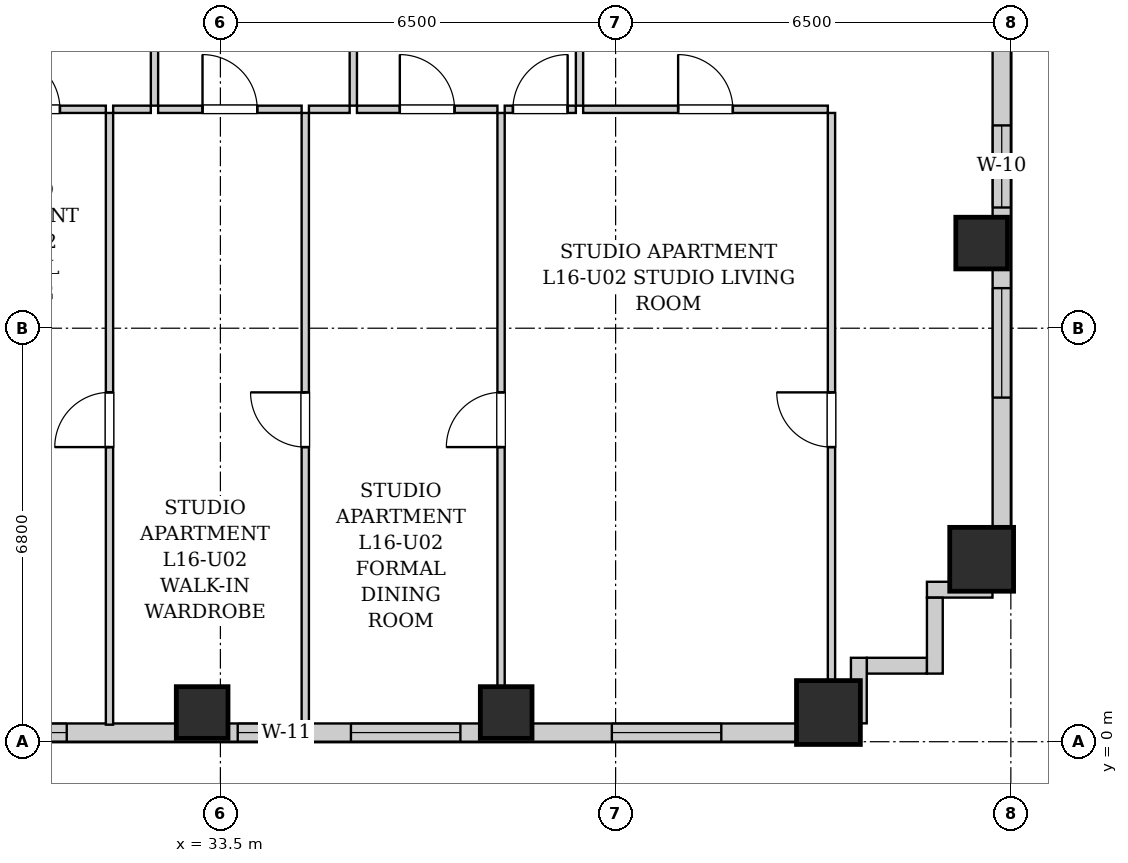
"""IFC4 building model, lengths in metres.
Left out: names, types, materials, properties, quantities, classifications, styles, units other than length and angle.
Written with IfcOpenShell. Run it as: python <this file> out.ifc"""

import sys

from ifc_helpers import new_model, si_unit, direction, frame, frame_2d, origin, origin_2d, place, context, subcontext, project, spatial, rectangle, extrude, element, fill, save


model = new_model("IFC4")
c1 = context("Model", 3, precision=1e-05, world=origin(), true_north=direction((0.0, 1.0)))
c2 = subcontext(c1, "Body", "Model", "MODEL_VIEW")
j1 = project(units=[si_unit("LENGTHUNIT", "METRE"), si_unit("PLANEANGLEUNIT", "RADIAN")], contexts=[c1])
p1 = place(None, origin())
s1 = spatial("IfcSite", under=j1, at=p1, CompositionType="ELEMENT")
p2 = place(p1, origin())
s2 = spatial("IfcBuilding", under=s1, at=p2, CompositionType="ELEMENT")
p3 = place(p2, frame((0.0, 0.0, 61.0)))
s3 = spatial("IfcBuildingStorey", under=s2, at=p3, CompositionType="ELEMENT", Elevation=61.0)
for number, where, z_axis, x_axis in (
    (1, (33.2, 0.48, 0.0), (0.0, 0.0, 1.0), (1.0, 0.0, 0.0)),
    (2, (38.2, 0.48, 0.0), (0.0, 0.0, 1.0), (1.0, 0.0, 0.0)),
):
    element("IfcColumn", number, at=place(p3, frame(where, z_axis=z_axis, x_axis=x_axis)), inside=s3, PredefinedType="COLUMN", context=c2, shape_type="SweptSolid", body=[
        extrude(rectangle(XDim=0.85, YDim=0.85, at=origin_2d()), origin(), (0.0, 0.0, 1.0), 3.2),
    ])
for number, where, z_axis, x_axis in (
    (3, (43.5, 0.48, 0.0), (0.0, 0.0, 1.0), (1.0, 0.0, 0.0)),
    (4, (46.02, 3.0, 0.0), (0.0, 0.0, 1.0), (1.0, 0.0, 0.0)),
):
    element("IfcColumn", number, at=place(p3, frame(where, z_axis=z_axis, x_axis=x_axis)), inside=s3, PredefinedType="COLUMN", context=c2, shape_type="SweptSolid", body=[
        extrude(rectangle(XDim=1.05, YDim=1.05, at=origin_2d()), origin(), (0.0, 0.0, 1.0), 3.2),
    ])
p4 = place(p3, frame((46.02, 8.2, 0.0), z_axis=(0.0, 0.0, 1.0), x_axis=(1.0, 0.0, 0.0)))
e5 = element("IfcColumn", 5, at=p4, inside=s3, PredefinedType="COLUMN", context=c2, shape_type="SweptSolid", body=[
    extrude(rectangle(XDim=0.85, YDim=0.85, at=origin_2d()), origin(), (0.0, 0.0, 1.0), 3.2),
])
p5 = place(p3, frame((46.35, 24.6, 0.0), z_axis=(0.0, 0.0, 1.0), x_axis=(0.0, -1.0, 0.0)))
e6 = element("IfcWall", 6, at=p5, inside=s3, PredefinedType="SOLIDWALL", context=c2, shape_type="SweptSolid", body=[
    extrude(rectangle(XDim=22.1, YDim=0.3, at=frame_2d((11.05, 0.0))), origin(), (0.0, 0.0, 1.0), 1.975),
])
p6 = place(p5, frame((17.141, 0.0, 0.55)))
e7 = element("IfcOpeningElement", 7, at=p6, cuts=e6, PredefinedType="OPENING", context=c2, shape_type="SweptSolid", body=[
    extrude(rectangle(XDim=1.8, YDim=1.2, at=frame_2d((0.9, 0.6))), frame((0.0, 0.16, 0.0), z_axis=(0.0, -1.0, 0.0), x_axis=(1.0, 0.0, 0.0)), (0.0, 0.0, 1.0), 0.32),
])
p7 = place(p5, frame((14.465, 0.0, 0.55)))
e8 = element("IfcOpeningElement", 8, at=p7, cuts=e6, PredefinedType="OPENING", context=c2, shape_type="SweptSolid", body=[
    extrude(rectangle(XDim=1.35, YDim=1.2, at=frame_2d((0.675, 0.6))), frame((0.0, 0.16, 0.0), z_axis=(0.0, -1.0, 0.0), x_axis=(1.0, 0.0, 0.0)), (0.0, 0.0, 1.0), 0.32),
])
p8 = place(p3, frame((44.0, 0.15, 0.0), z_axis=(0.0, 0.0, 1.0), x_axis=(-1.0, 0.0, 0.0)))
e9 = element("IfcWall", 9, at=p8, inside=s3, PredefinedType="SOLIDWALL", context=c2, shape_type="SweptSolid", body=[
    extrude(rectangle(XDim=26.35, YDim=0.3, at=frame_2d((13.175, 0.0))), origin(), (0.0, 0.0, 1.0), 1.975),
])
p9 = place(p8, frame((22.665, 0.0, 0.55)))
e10 = element("IfcOpeningElement", 10, at=p9, cuts=e9, PredefinedType="OPENING", context=c2, shape_type="SweptSolid", body=[
    extrude(rectangle(XDim=1.8, YDim=1.2, at=frame_2d((0.9, 0.6))), frame((0.0, 0.16, 0.0), z_axis=(0.0, -1.0, 0.0), x_axis=(1.0, 0.0, 0.0)), (0.0, 0.0, 1.0), 0.32),
])
p10 = place(p8, frame((15.82, 0.0, 0.55)))
e11 = element("IfcOpeningElement", 11, at=p10, cuts=e9, PredefinedType="OPENING", context=c2, shape_type="SweptSolid", body=[
    extrude(rectangle(XDim=0.68, YDim=1.2, at=frame_2d((0.34, 0.6))), frame((0.0, 0.16, 0.0), z_axis=(0.0, -1.0, 0.0), x_axis=(1.0, 0.0, 0.0)), (0.0, 0.0, 1.0), 0.32),
])
p11 = place(p8, frame((13.027, 0.0, 0.55)))
e12 = element("IfcOpeningElement", 12, at=p11, cuts=e9, PredefinedType="OPENING", context=c2, shape_type="SweptSolid", body=[
    extrude(rectangle(XDim=1.8, YDim=1.2, at=frame_2d((0.9, 0.6))), frame((0.0, 0.16, 0.0), z_axis=(0.0, -1.0, 0.0), x_axis=(1.0, 0.0, 0.0)), (0.0, 0.0, 1.0), 0.32),
])
p12 = place(p8, frame((9.365, 0.0, 0.55)))
e13 = element("IfcOpeningElement", 13, at=p12, cuts=e9, PredefinedType="OPENING", context=c2, shape_type="SweptSolid", body=[
    extrude(rectangle(XDim=0.85, YDim=1.2, at=frame_2d((0.425, 0.6))), frame((0.0, 0.16, 0.0), z_axis=(0.0, -1.0, 0.0), x_axis=(1.0, 0.0, 0.0)), (0.0, 0.0, 1.0), 0.32),
])
p13 = place(p8, frame((6.553, 0.0, 0.55)))
e14 = element("IfcOpeningElement", 14, at=p13, cuts=e9, PredefinedType="OPENING", context=c2, shape_type="SweptSolid", body=[
    extrude(rectangle(XDim=1.8, YDim=1.2, at=frame_2d((0.9, 0.6))), frame((0.0, 0.16, 0.0), z_axis=(0.0, -1.0, 0.0), x_axis=(1.0, 0.0, 0.0)), (0.0, 0.0, 1.0), 0.32),
])
p14 = place(p8, frame((2.262, 0.0, 0.55)))
e15 = element("IfcOpeningElement", 15, at=p14, cuts=e9, PredefinedType="OPENING", context=c2, shape_type="SweptSolid", body=[
    extrude(rectangle(XDim=1.8, YDim=1.2, at=frame_2d((0.9, 0.6))), frame((0.0, 0.16, 0.0), z_axis=(0.0, -1.0, 0.0), x_axis=(1.0, 0.0, 0.0)), (0.0, 0.0, 1.0), 0.32),
])
p15 = place(p3, frame((46.198, 2.5, 0.0), z_axis=(0.0, 0.0, 1.0), x_axis=(-1.0, 0.0, 0.0)))
e16 = element("IfcWall", 16, at=p15, inside=s3, PredefinedType="SOLIDWALL", context=c2, shape_type="SweptSolid", body=[
    extrude(rectangle(XDim=1.078, YDim=0.26, at=frame_2d((0.539, 0.0))), origin(), (0.0, 0.0, 1.0), 2.94),
])
p16 = place(p3, frame((45.25, 2.368, 0.0), z_axis=(0.0, 0.0, 1.0), x_axis=(0.0, -1.0, 0.0)))
e17 = element("IfcWall", 17, at=p16, inside=s3, PredefinedType="SOLIDWALL", context=c2, shape_type="SweptSolid", body=[
    extrude(rectangle(XDim=1.248, YDim=0.26, at=frame_2d((0.624, 0.0))), origin(), (0.0, 0.0, 1.0), 2.94),
])
p17 = place(p3, frame((45.118, 1.25, 0.0), z_axis=(0.0, 0.0, 1.0), x_axis=(-1.0, 0.0, 0.0)))
e18 = element("IfcWall", 18, at=p17, inside=s3, PredefinedType="SOLIDWALL", context=c2, shape_type="SweptSolid", body=[
    extrude(rectangle(XDim=0.986, YDim=0.26, at=frame_2d((0.493, 0.0))), origin(), (0.0, 0.0, 1.0), 2.94),
])
p18 = place(p3, frame((44.0, 1.38, 0.0), z_axis=(0.0, 0.0, 1.0), x_axis=(0.0, -1.0, 0.0)))
e19 = element("IfcWall", 19, at=p18, inside=s3, PredefinedType="SOLIDWALL", context=c2, shape_type="SweptSolid", body=[
    extrude(rectangle(XDim=1.078, YDim=0.26, at=frame_2d((0.539, 0.0))), origin(), (0.0, 0.0, 1.0), 2.94),
])
p19 = place(p3, frame((32.416, 10.46, 0.0), z_axis=(0.0, 0.0, 1.0), x_axis=(0.0, 1.0, 0.0)))
e20 = element("IfcWall", 20, at=p19, inside=s3, PredefinedType="PARTITIONING", context=c2, shape_type="SweptSolid", body=[
    extrude(rectangle(XDim=2.85, YDim=0.12, at=frame_2d((1.425, 0.0))), origin(), (0.0, 0.0, 1.0), 2.94),
])
p20 = place(p19, frame((0.975, 0.0, 0.0)))
e21 = element("IfcOpeningElement", 21, at=p20, cuts=e20, PredefinedType="OPENING", context=c2, shape_type="SweptSolid", body=[
    extrude(rectangle(XDim=0.9, YDim=2.05, at=frame_2d((0.45, 1.025))), frame((0.0, 0.07, 0.0), z_axis=(0.0, -1.0, 0.0), x_axis=(1.0, 0.0, 0.0)), (0.0, 0.0, 1.0), 0.14),
])
p21 = place(p3, frame((29.206, 10.4, 0.0), z_axis=(0.0, 0.0, 1.0), x_axis=(1.0, 0.0, 0.0)))
e22 = element("IfcWall", 22, at=p21, inside=s3, PredefinedType="PARTITIONING", context=c2, shape_type="SweptSolid", body=[
    extrude(rectangle(XDim=2.41, YDim=0.12, at=frame_2d((1.205, 0.0))), origin(), (0.0, 0.0, 1.0), 2.94),
])
p22 = place(p21, frame((0.755, 0.0, 0.0)))
e23 = element("IfcOpeningElement", 23, at=p22, cuts=e22, PredefinedType="OPENING", context=c2, shape_type="SweptSolid", body=[
    extrude(rectangle(XDim=0.9, YDim=2.05, at=frame_2d((0.45, 1.025))), frame((0.0, 0.07, 0.0), z_axis=(0.0, -1.0, 0.0), x_axis=(1.0, 0.0, 0.0)), (0.0, 0.0, 1.0), 0.14),
])
p23 = place(p3, frame((31.736, 10.4, 0.0), z_axis=(0.0, 0.0, 1.0), x_axis=(1.0, 0.0, 0.0)))
e24 = element("IfcWall", 24, at=p23, inside=s3, PredefinedType="PARTITIONING", context=c2, shape_type="SweptSolid", body=[
    extrude(rectangle(XDim=0.62, YDim=0.12, at=frame_2d((0.31, 0.0))), origin(), (0.0, 0.0, 1.0), 2.94),
])
p24 = place(p3, frame((35.686, 10.46, 0.0), z_axis=(0.0, 0.0, 1.0), x_axis=(0.0, 1.0, 0.0)))
e25 = element("IfcWall", 25, at=p24, inside=s3, PredefinedType="PARTITIONING", context=c2, shape_type="SweptSolid", body=[
    extrude(rectangle(XDim=2.85, YDim=0.12, at=frame_2d((1.425, 0.0))), origin(), (0.0, 0.0, 1.0), 2.94),
])
p25 = place(p24, frame((0.975, 0.0, 0.0)))
e26 = element("IfcOpeningElement", 26, at=p25, cuts=e25, PredefinedType="OPENING", context=c2, shape_type="SweptSolid", body=[
    extrude(rectangle(XDim=0.9, YDim=2.05, at=frame_2d((0.45, 1.025))), frame((0.0, 0.07, 0.0), z_axis=(0.0, -1.0, 0.0), x_axis=(1.0, 0.0, 0.0)), (0.0, 0.0, 1.0), 0.14),
])
p26 = place(p3, frame((32.476, 10.4, 0.0), z_axis=(0.0, 0.0, 1.0), x_axis=(1.0, 0.0, 0.0)))
e27 = element("IfcWall", 27, at=p26, inside=s3, PredefinedType="PARTITIONING", context=c2, shape_type="SweptSolid", body=[
    extrude(rectangle(XDim=2.36, YDim=0.12, at=frame_2d((1.18, 0.0))), origin(), (0.0, 0.0, 1.0), 2.94),
])
p27 = place(p26, frame((0.73, 0.0, 0.0)))
e28 = element("IfcOpeningElement", 28, at=p27, cuts=e27, PredefinedType="OPENING", context=c2, shape_type="SweptSolid", body=[
    extrude(rectangle(XDim=0.9, YDim=2.05, at=frame_2d((0.45, 1.025))), frame((0.0, 0.07, 0.0), z_axis=(0.0, -1.0, 0.0), x_axis=(1.0, 0.0, 0.0)), (0.0, 0.0, 1.0), 0.14),
])
p28 = place(p3, frame((34.956, 10.4, 0.0), z_axis=(0.0, 0.0, 1.0), x_axis=(1.0, 0.0, 0.0)))
e29 = element("IfcWall", 29, at=p28, inside=s3, PredefinedType="PARTITIONING", context=c2, shape_type="SweptSolid", body=[
    extrude(rectangle(XDim=0.67, YDim=0.12, at=frame_2d((0.335, 0.0))), origin(), (0.0, 0.0, 1.0), 2.94),
])
p29 = place(p3, frame((39.406, 10.46, 0.0), z_axis=(0.0, 0.0, 1.0), x_axis=(0.0, 1.0, 0.0)))
e30 = element("IfcWall", 30, at=p29, inside=s3, PredefinedType="PARTITIONING", context=c2, shape_type="SweptSolid", body=[
    extrude(rectangle(XDim=2.85, YDim=0.12, at=frame_2d((1.425, 0.0))), origin(), (0.0, 0.0, 1.0), 2.94),
])
p30 = place(p29, frame((0.975, 0.0, 0.0)))
e31 = element("IfcOpeningElement", 31, at=p30, cuts=e30, PredefinedType="OPENING", context=c2, shape_type="SweptSolid", body=[
    extrude(rectangle(XDim=0.9, YDim=2.05, at=frame_2d((0.45, 1.025))), frame((0.0, 0.07, 0.0), z_axis=(0.0, -1.0, 0.0), x_axis=(1.0, 0.0, 0.0)), (0.0, 0.0, 1.0), 0.14),
])
p31 = place(p3, frame((35.746, 10.4, 0.0), z_axis=(0.0, 0.0, 1.0), x_axis=(1.0, 0.0, 0.0)))
e32 = element("IfcWall", 32, at=p31, inside=s3, PredefinedType="PARTITIONING", context=c2, shape_type="SweptSolid", body=[
    extrude(rectangle(XDim=2.31, YDim=0.12, at=frame_2d((1.155, 0.0))), origin(), (0.0, 0.0, 1.0), 2.94),
])
p32 = place(p31, frame((0.705, 0.0, 0.0)))
e33 = element("IfcOpeningElement", 33, at=p32, cuts=e32, PredefinedType="OPENING", context=c2, shape_type="SweptSolid", body=[
    extrude(rectangle(XDim=0.9, YDim=2.05, at=frame_2d((0.45, 1.025))), frame((0.0, 0.07, 0.0), z_axis=(0.0, -1.0, 0.0), x_axis=(1.0, 0.0, 0.0)), (0.0, 0.0, 1.0), 0.14),
])
p33 = place(p3, frame((38.176, 10.4, 0.0), z_axis=(0.0, 0.0, 1.0), x_axis=(1.0, 0.0, 0.0)))
e34 = element("IfcWall", 34, at=p33, inside=s3, PredefinedType="PARTITIONING", context=c2, shape_type="SweptSolid", body=[
    extrude(rectangle(XDim=1.17, YDim=0.12, at=frame_2d((0.585, 0.0))), origin(), (0.0, 0.0, 1.0), 2.94),
])
p34 = place(p33, frame((0.135, 0.0, 0.0)))
e35 = element("IfcOpeningElement", 35, at=p34, cuts=e34, PredefinedType="OPENING", context=c2, shape_type="SweptSolid", body=[
    extrude(rectangle(XDim=0.9, YDim=2.05, at=frame_2d((0.45, 1.025))), frame((0.0, 0.07, 0.0), z_axis=(0.0, -1.0, 0.0), x_axis=(1.0, 0.0, 0.0)), (0.0, 0.0, 1.0), 0.14),
])
p35 = place(p3, frame((39.466, 10.4, 0.0), z_axis=(0.0, 0.0, 1.0), x_axis=(1.0, 0.0, 0.0)))
e36 = element("IfcWall", 36, at=p35, inside=s3, PredefinedType="PARTITIONING", context=c2, shape_type="SweptSolid", body=[
    extrude(rectangle(XDim=4.024, YDim=0.12, at=frame_2d((2.012, 0.0))), origin(), (0.0, 0.0, 1.0), 2.94),
])
p36 = place(p35, frame((1.562, 0.0, 0.0)))
e37 = element("IfcOpeningElement", 37, at=p36, cuts=e36, PredefinedType="OPENING", context=c2, shape_type="SweptSolid", body=[
    extrude(rectangle(XDim=0.9, YDim=2.05, at=frame_2d((0.45, 1.025))), frame((0.0, 0.07, 0.0), z_axis=(0.0, -1.0, 0.0), x_axis=(1.0, 0.0, 0.0)), (0.0, 0.0, 1.0), 0.14),
])
p37 = place(p3, frame((31.676, 0.28, 0.0), z_axis=(0.0, 0.0, 1.0), x_axis=(0.0, 1.0, 0.0)))
e38 = element("IfcWall", 38, at=p37, inside=s3, PredefinedType="PARTITIONING", context=c2, shape_type="SweptSolid", body=[
    extrude(rectangle(XDim=10.06, YDim=0.12, at=frame_2d((5.03, 0.0))), origin(), (0.0, 0.0, 1.0), 2.94),
])
p38 = place(p37, frame((4.565, 0.0, 0.0)))
e39 = element("IfcOpeningElement", 39, at=p38, cuts=e38, PredefinedType="OPENING", context=c2, shape_type="SweptSolid", body=[
    extrude(rectangle(XDim=0.9, YDim=2.05, at=frame_2d((0.45, 1.025))), frame((0.0, 0.07, 0.0), z_axis=(0.0, -1.0, 0.0), x_axis=(1.0, 0.0, 0.0)), (0.0, 0.0, 1.0), 0.14),
])
p39 = place(p3, frame((34.896, 0.28, 0.0), z_axis=(0.0, 0.0, 1.0), x_axis=(0.0, 1.0, 0.0)))
e40 = element("IfcWall", 40, at=p39, inside=s3, PredefinedType="PARTITIONING", context=c2, shape_type="SweptSolid", body=[
    extrude(rectangle(XDim=10.06, YDim=0.12, at=frame_2d((5.03, 0.0))), origin(), (0.0, 0.0, 1.0), 2.94),
])
p40 = place(p39, frame((4.565, 0.0, 0.0)))
e41 = element("IfcOpeningElement", 41, at=p40, cuts=e40, PredefinedType="OPENING", context=c2, shape_type="SweptSolid", body=[
    extrude(rectangle(XDim=0.9, YDim=2.05, at=frame_2d((0.45, 1.025))), frame((0.0, 0.07, 0.0), z_axis=(0.0, -1.0, 0.0), x_axis=(1.0, 0.0, 0.0)), (0.0, 0.0, 1.0), 0.14),
])
p41 = place(p3, frame((38.116, 0.28, 0.0), z_axis=(0.0, 0.0, 1.0), x_axis=(0.0, 1.0, 0.0)))
e42 = element("IfcWall", 42, at=p41, inside=s3, PredefinedType="PARTITIONING", context=c2, shape_type="SweptSolid", body=[
    extrude(rectangle(XDim=10.06, YDim=0.12, at=frame_2d((5.03, 0.0))), origin(), (0.0, 0.0, 1.0), 2.94),
])
p42 = place(p41, frame((4.565, 0.0, 0.0)))
e43 = element("IfcOpeningElement", 43, at=p42, cuts=e42, PredefinedType="OPENING", context=c2, shape_type="SweptSolid", body=[
    extrude(rectangle(XDim=0.9, YDim=2.05, at=frame_2d((0.45, 1.025))), frame((0.0, 0.07, 0.0), z_axis=(0.0, -1.0, 0.0), x_axis=(1.0, 0.0, 0.0)), (0.0, 0.0, 1.0), 0.14),
])
p43 = place(p3, frame((43.55, 0.28, 0.0), z_axis=(0.0, 0.0, 1.0), x_axis=(0.0, 1.0, 0.0)))
e44 = element("IfcWall", 44, at=p43, inside=s3, PredefinedType="PARTITIONING", context=c2, shape_type="SweptSolid", body=[
    extrude(rectangle(XDim=10.06, YDim=0.12, at=frame_2d((5.03, 0.0))), origin(), (0.0, 0.0, 1.0), 2.94),
])
p44 = place(p43, frame((4.565, 0.0, 0.0)))
e45 = element("IfcOpeningElement", 45, at=p44, cuts=e44, PredefinedType="OPENING", context=c2, shape_type="SweptSolid", body=[
    extrude(rectangle(XDim=0.9, YDim=2.05, at=frame_2d((0.45, 1.025))), frame((0.0, 0.07, 0.0), z_axis=(0.0, -1.0, 0.0), x_axis=(1.0, 0.0, 0.0)), (0.0, 0.0, 1.0), 0.14),
])
p45 = place(p22, origin())
e46 = element("IfcDoor", 46, at=p45, inside=s3, OperationType="SINGLE_SWING_LEFT", PredefinedType="DOOR", context=c2, shape_type="SweptSolid", body=[
    extrude(rectangle(XDim=0.9, YDim=2.05, at=frame_2d((0.45, 1.025))), frame((0.0, 0.025, 0.0), z_axis=(0.0, -1.0, 0.0), x_axis=(1.0, 0.0, 0.0)), (0.0, 0.0, 1.0), 0.05),
])
fill(e23, e46)
p46 = place(p27, origin())
e47 = element("IfcDoor", 47, at=p46, inside=s3, OperationType="SINGLE_SWING_LEFT", PredefinedType="DOOR", context=c2, shape_type="SweptSolid", body=[
    extrude(rectangle(XDim=0.9, YDim=2.05, at=frame_2d((0.45, 1.025))), frame((0.0, 0.025, 0.0), z_axis=(0.0, -1.0, 0.0), x_axis=(1.0, 0.0, 0.0)), (0.0, 0.0, 1.0), 0.05),
])
fill(e28, e47)
p47 = place(p32, origin())
e48 = element("IfcDoor", 48, at=p47, inside=s3, OperationType="SINGLE_SWING_LEFT", PredefinedType="DOOR", context=c2, shape_type="SweptSolid", body=[
    extrude(rectangle(XDim=0.9, YDim=2.05, at=frame_2d((0.45, 1.025))), frame((0.0, 0.025, 0.0), z_axis=(0.0, -1.0, 0.0), x_axis=(1.0, 0.0, 0.0)), (0.0, 0.0, 1.0), 0.05),
])
fill(e33, e48)
p48 = place(p34, origin())
e49 = element("IfcDoor", 49, at=p48, inside=s3, OperationType="SINGLE_SWING_RIGHT", PredefinedType="DOOR", context=c2, shape_type="SweptSolid", body=[
    extrude(rectangle(XDim=0.9, YDim=2.05, at=frame_2d((0.45, 1.025))), frame((0.0, 0.025, 0.0), z_axis=(0.0, -1.0, 0.0), x_axis=(1.0, 0.0, 0.0)), (0.0, 0.0, 1.0), 0.05),
])
fill(e35, e49)
p49 = place(p36, origin())
e50 = element("IfcDoor", 50, at=p49, inside=s3, OperationType="SINGLE_SWING_LEFT", PredefinedType="DOOR", context=c2, shape_type="SweptSolid", body=[
    extrude(rectangle(XDim=0.9, YDim=2.05, at=frame_2d((0.45, 1.025))), frame((0.0, 0.025, 0.0), z_axis=(0.0, -1.0, 0.0), x_axis=(1.0, 0.0, 0.0)), (0.0, 0.0, 1.0), 0.05),
])
fill(e37, e50)
p50 = place(p38, origin())
e51 = element("IfcDoor", 51, at=p50, inside=s3, OperationType="SINGLE_SWING_LEFT", PredefinedType="DOOR", context=c2, shape_type="SweptSolid", body=[
    extrude(rectangle(XDim=0.9, YDim=2.05, at=frame_2d((0.45, 1.025))), frame((0.0, 0.025, 0.0), z_axis=(0.0, -1.0, 0.0), x_axis=(1.0, 0.0, 0.0)), (0.0, 0.0, 1.0), 0.05),
])
fill(e39, e51)
p51 = place(p40, origin())
e52 = element("IfcDoor", 52, at=p51, inside=s3, OperationType="SINGLE_SWING_RIGHT", PredefinedType="DOOR", context=c2, shape_type="SweptSolid", body=[
    extrude(rectangle(XDim=0.9, YDim=2.05, at=frame_2d((0.45, 1.025))), frame((0.0, 0.025, 0.0), z_axis=(0.0, -1.0, 0.0), x_axis=(1.0, 0.0, 0.0)), (0.0, 0.0, 1.0), 0.05),
])
fill(e41, e52)
p52 = place(p42, origin())
e53 = element("IfcDoor", 53, at=p52, inside=s3, OperationType="SINGLE_SWING_LEFT", PredefinedType="DOOR", context=c2, shape_type="SweptSolid", body=[
    extrude(rectangle(XDim=0.9, YDim=2.05, at=frame_2d((0.45, 1.025))), frame((0.0, 0.025, 0.0), z_axis=(0.0, -1.0, 0.0), x_axis=(1.0, 0.0, 0.0)), (0.0, 0.0, 1.0), 0.05),
])
fill(e43, e53)
p53 = place(p44, origin())
e54 = element("IfcDoor", 54, at=p53, inside=s3, OperationType="SINGLE_SWING_RIGHT", PredefinedType="DOOR", context=c2, shape_type="SweptSolid", body=[
    extrude(rectangle(XDim=0.9, YDim=2.05, at=frame_2d((0.45, 1.025))), frame((0.0, 0.025, 0.0), z_axis=(0.0, -1.0, 0.0), x_axis=(1.0, 0.0, 0.0)), (0.0, 0.0, 1.0), 0.05),
])
fill(e45, e54)
p54 = place(p11, origin())
e55 = element("IfcWindow", 55, at=p54, inside=s3, PartitioningType="DOUBLE_PANEL_VERTICAL", PredefinedType="WINDOW", context=c2, shape_type="SweptSolid", body=[
    extrude(rectangle(XDim=1.8, YDim=1.2, at=frame_2d((0.9, 0.6))), frame((0.0, 0.03, 0.0), z_axis=(0.0, -1.0, 0.0), x_axis=(1.0, 0.0, 0.0)), (0.0, 0.0, 1.0), 0.06),
])
fill(e12, e55)
p55 = place(p12, origin())
e56 = element("IfcWindow", 56, at=p55, inside=s3, PartitioningType="SINGLE_PANEL", PredefinedType="WINDOW", context=c2, shape_type="SweptSolid", body=[
    extrude(rectangle(XDim=0.85, YDim=1.2, at=frame_2d((0.425, 0.6))), frame((0.0, 0.03, 0.0), z_axis=(0.0, -1.0, 0.0), x_axis=(1.0, 0.0, 0.0)), (0.0, 0.0, 1.0), 0.06),
])
fill(e13, e56)
p56 = place(p13, origin())
e57 = element("IfcWindow", 57, at=p56, inside=s3, PartitioningType="DOUBLE_PANEL_VERTICAL", PredefinedType="WINDOW", context=c2, shape_type="SweptSolid", body=[
    extrude(rectangle(XDim=1.8, YDim=1.2, at=frame_2d((0.9, 0.6))), frame((0.0, 0.03, 0.0), z_axis=(0.0, -1.0, 0.0), x_axis=(1.0, 0.0, 0.0)), (0.0, 0.0, 1.0), 0.06),
])
fill(e14, e57)
p57 = place(p14, origin())
e58 = element("IfcWindow", 58, at=p57, inside=s3, PartitioningType="DOUBLE_PANEL_VERTICAL", PredefinedType="WINDOW", context=c2, shape_type="SweptSolid", body=[
    extrude(rectangle(XDim=1.8, YDim=1.2, at=frame_2d((0.9, 0.6))), frame((0.0, 0.03, 0.0), z_axis=(0.0, -1.0, 0.0), x_axis=(1.0, 0.0, 0.0)), (0.0, 0.0, 1.0), 0.06),
])
fill(e15, e58)
p58 = place(p6, origin())
e59 = element("IfcWindow", 59, at=p58, inside=s3, PartitioningType="DOUBLE_PANEL_VERTICAL", PredefinedType="WINDOW", context=c2, shape_type="SweptSolid", body=[
    extrude(rectangle(XDim=1.8, YDim=1.2, at=frame_2d((0.9, 0.6))), frame((0.0, 0.03, 0.0), z_axis=(0.0, -1.0, 0.0), x_axis=(1.0, 0.0, 0.0)), (0.0, 0.0, 1.0), 0.06),
])
fill(e7, e59)
p59 = place(p7, origin())
e60 = element("IfcWindow", 60, at=p59, inside=s3, PartitioningType="SINGLE_PANEL", PredefinedType="WINDOW", context=c2, shape_type="SweptSolid", body=[
    extrude(rectangle(XDim=1.35, YDim=1.2, at=frame_2d((0.675, 0.6))), frame((0.0, 0.03, 0.0), z_axis=(0.0, -1.0, 0.0), x_axis=(1.0, 0.0, 0.0)), (0.0, 0.0, 1.0), 0.06),
])
fill(e8, e60)
save(model, sys.argv[1])
